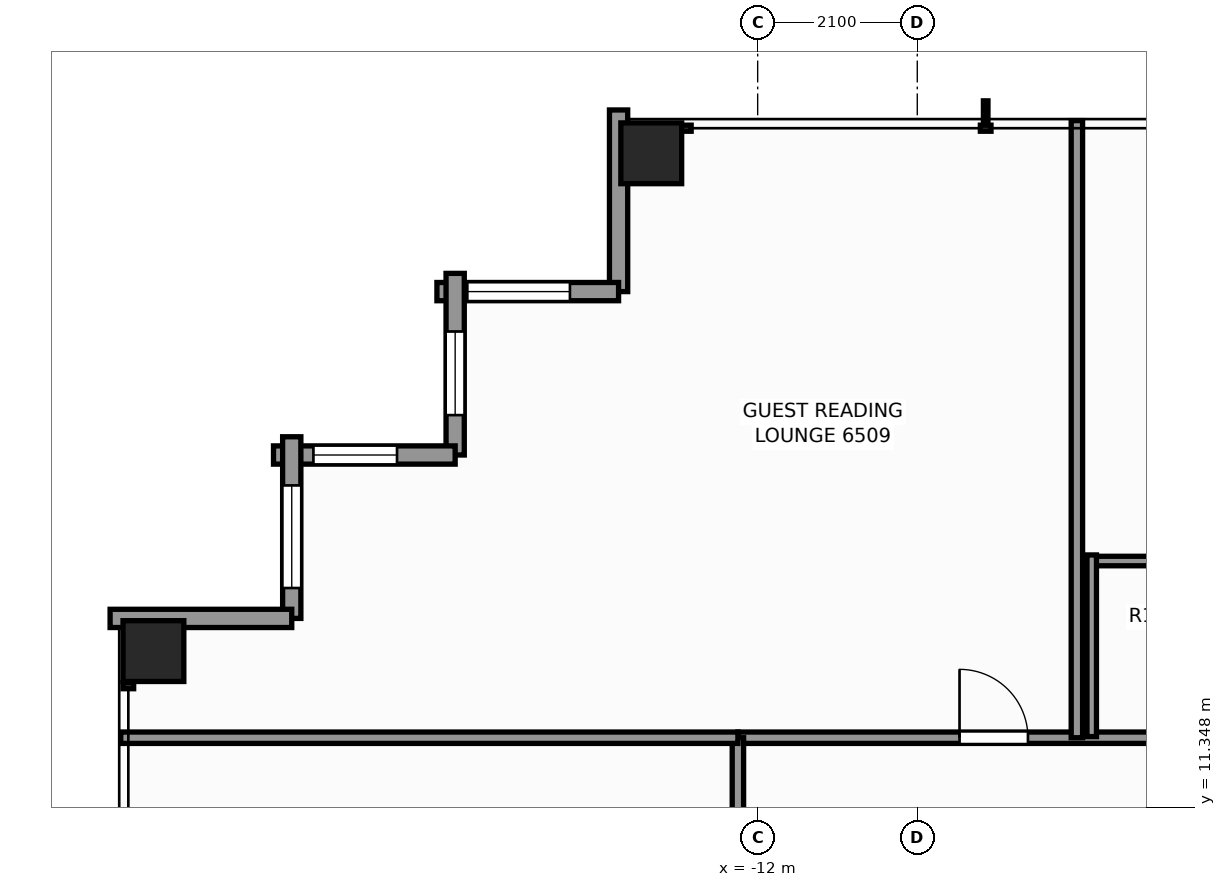
"""IFC4 building model, lengths in metres.
Left out: names, types, materials, properties, quantities, classifications, styles, units other than length and angle.
Written with IfcOpenShell. Run it as: python <this file> out.ifc"""

import sys

from ifc_helpers import new_model, si_unit, direction, frame, frame_2d, origin, origin_2d, place, context, subcontext, project, spatial, rectangle, extrude, element, fill, save


model = new_model("IFC4")
c1 = context("Model", 3, precision=1e-05, world=origin(), true_north=direction((0.0, 1.0)))
c2 = subcontext(c1, "Body", "Model", "MODEL_VIEW")
j1 = project(units=[si_unit("LENGTHUNIT", "METRE"), si_unit("PLANEANGLEUNIT", "RADIAN")], contexts=[c1])
p1 = place(None, origin())
s1 = spatial("IfcSite", under=j1, at=p1, CompositionType="ELEMENT")
p2 = place(p1, origin())
s2 = spatial("IfcBuilding", under=s1, at=p2, CompositionType="ELEMENT")
p3 = place(p2, frame((0.0, 0.0, 222.9)))
s3 = spatial("IfcBuildingStorey", under=s2, at=p3, CompositionType="ELEMENT", Elevation=222.9)
for number, where, z_axis, x_axis in (
    (1, (-13.4, 19.95, 0.0), (0.0, 0.0, 1.0), (1.0, 0.0, 0.0)),
    (2, (-19.95, 13.4, 0.0), (0.0, 0.0, 1.0), (1.0, 0.0, 0.0)),
):
    element("IfcColumn", number, at=place(p3, frame(where, z_axis=z_axis, x_axis=x_axis)), inside=s3, PredefinedType="COLUMN", context=c2, shape_type="SweptSolid", body=[
        extrude(rectangle(XDim=0.8, YDim=0.8, at=origin_2d()), origin(), (0.0, 0.0, 1.0), 3.3),
    ])
p4 = place(p3, frame((-13.83, 18.13, 0.0), z_axis=(0.0, 0.0, 1.0), x_axis=(0.0, 1.0, 0.0)))
e3 = element("IfcWall", 3, at=p4, inside=s3, PredefinedType="STANDARD", context=c2, shape_type="SweptSolid", body=[
    extrude(rectangle(XDim=2.39, YDim=0.24, at=frame_2d((1.195, 0.0))), origin(), (0.0, 0.0, 1.0), 2.463),
])
p5 = place(p3, frame((-16.22, 18.13, 0.0), z_axis=(0.0, 0.0, 1.0), x_axis=(1.0, 0.0, 0.0)))
e4 = element("IfcWall", 4, at=p5, inside=s3, PredefinedType="STANDARD", context=c2, shape_type="SweptSolid", body=[
    extrude(rectangle(XDim=2.39, YDim=0.24, at=frame_2d((1.195, 0.0))), origin(), (0.0, 0.0, 1.0), 2.463),
])
p6 = place(p5, frame((0.4, 0.0, 0.65)))
e5 = element("IfcOpeningElement", 5, at=p6, cuts=e4, PredefinedType="OPENING", context=c2, shape_type="SweptSolid", body=[
    extrude(rectangle(XDim=1.35, YDim=1.55, at=frame_2d((0.675, 0.775))), frame((0.0, 0.13, 0.0), z_axis=(0.0, -1.0, 0.0), x_axis=(1.0, 0.0, 0.0)), (0.0, 0.0, 1.0), 0.26),
])
p7 = place(p3, frame((-15.98, 15.98, 0.0), z_axis=(0.0, 0.0, 1.0), x_axis=(0.0, 1.0, 0.0)))
e6 = element("IfcWall", 6, at=p7, inside=s3, PredefinedType="STANDARD", context=c2, shape_type="SweptSolid", body=[
    extrude(rectangle(XDim=2.39, YDim=0.24, at=frame_2d((1.195, 0.0))), origin(), (0.0, 0.0, 1.0), 2.463),
])
p8 = place(p7, frame((0.525, 0.0, 0.65)))
e7 = element("IfcOpeningElement", 7, at=p8, cuts=e6, PredefinedType="OPENING", context=c2, shape_type="SweptSolid", body=[
    extrude(rectangle(XDim=1.1, YDim=1.45, at=frame_2d((0.55, 0.725))), frame((0.0, 0.13, 0.0), z_axis=(0.0, -1.0, 0.0), x_axis=(1.0, 0.0, 0.0)), (0.0, 0.0, 1.0), 0.26),
])
p9 = place(p3, frame((-18.37, 15.98, 0.0), z_axis=(0.0, 0.0, 1.0), x_axis=(1.0, 0.0, 0.0)))
e8 = element("IfcWall", 8, at=p9, inside=s3, PredefinedType="STANDARD", context=c2, shape_type="SweptSolid", body=[
    extrude(rectangle(XDim=2.39, YDim=0.24, at=frame_2d((1.195, 0.0))), origin(), (0.0, 0.0, 1.0), 2.463),
])
p10 = place(p9, frame((0.525, 0.0, 0.65)))
e9 = element("IfcOpeningElement", 9, at=p10, cuts=e8, PredefinedType="OPENING", context=c2, shape_type="SweptSolid", body=[
    extrude(rectangle(XDim=1.1, YDim=1.45, at=frame_2d((0.55, 0.725))), frame((0.0, 0.13, 0.0), z_axis=(0.0, -1.0, 0.0), x_axis=(1.0, 0.0, 0.0)), (0.0, 0.0, 1.0), 0.26),
])
p11 = place(p3, frame((-18.13, 13.83, 0.0), z_axis=(0.0, 0.0, 1.0), x_axis=(0.0, 1.0, 0.0)))
e10 = element("IfcWall", 10, at=p11, inside=s3, PredefinedType="STANDARD", context=c2, shape_type="SweptSolid", body=[
    extrude(rectangle(XDim=2.39, YDim=0.24, at=frame_2d((1.195, 0.0))), origin(), (0.0, 0.0, 1.0), 2.463),
])
p12 = place(p11, frame((0.4, 0.0, 0.65)))
e11 = element("IfcOpeningElement", 11, at=p12, cuts=e10, PredefinedType="OPENING", context=c2, shape_type="SweptSolid", body=[
    extrude(rectangle(XDim=1.35, YDim=1.55, at=frame_2d((0.675, 0.775))), frame((0.0, 0.13, 0.0), z_axis=(0.0, -1.0, 0.0), x_axis=(1.0, 0.0, 0.0)), (0.0, 0.0, 1.0), 0.26),
])
p13 = place(p3, frame((-20.52, 13.83, 0.0), z_axis=(0.0, 0.0, 1.0), x_axis=(1.0, 0.0, 0.0)))
e12 = element("IfcWall", 12, at=p13, inside=s3, PredefinedType="STANDARD", context=c2, shape_type="SweptSolid", body=[
    extrude(rectangle(XDim=2.39, YDim=0.24, at=frame_2d((1.195, 0.0))), origin(), (0.0, 0.0, 1.0), 2.463),
])
p14 = place(p3, frame((-12.26, 12.26, 0.0), z_axis=(0.0, 0.0, 1.0), x_axis=(1.0, 0.0, 0.0)))
e13 = element("IfcWall", 13, at=p14, inside=s3, PredefinedType="PARTITIONING", context=c2, shape_type="SweptSolid", body=[
    extrude(rectangle(XDim=24.52, YDim=0.15, at=frame_2d((12.26, 0.0))), origin(), (0.0, 0.0, 1.0), 2.369),
])
p15 = place(p14, frame((2.916, 0.0, 0.0)))
e14 = element("IfcOpeningElement", 14, at=p15, cuts=e13, PredefinedType="OPENING", context=c2, shape_type="SweptSolid", body=[
    extrude(rectangle(XDim=0.9, YDim=2.06, at=frame_2d((0.45, 1.03))), frame((0.0, 0.085, 0.0), z_axis=(0.0, -1.0, 0.0), x_axis=(1.0, 0.0, 0.0)), (0.0, 0.0, 1.0), 0.17),
])
p16 = place(p14, frame((9.755, 0.0, 0.0)))
e15 = element("IfcOpeningElement", 15, at=p16, cuts=e13, PredefinedType="OPENING", context=c2, shape_type="SweptSolid", body=[
    extrude(rectangle(XDim=0.95, YDim=2.06, at=frame_2d((0.475, 1.03))), frame((0.0, 0.085, 0.0), z_axis=(0.0, -1.0, 0.0), x_axis=(1.0, 0.0, 0.0)), (0.0, 0.0, 1.0), 0.17),
])
p17 = place(p14, frame((19.345, 0.0, 0.0)))
e16 = element("IfcOpeningElement", 16, at=p17, cuts=e13, PredefinedType="OPENING", context=c2, shape_type="SweptSolid", body=[
    extrude(rectangle(XDim=0.9, YDim=2.06, at=frame_2d((0.45, 1.03))), frame((0.0, 0.085, 0.0), z_axis=(0.0, -1.0, 0.0), x_axis=(1.0, 0.0, 0.0)), (0.0, 0.0, 1.0), 0.17),
])
p18 = place(p3, frame((-12.26, -12.58, 0.0), z_axis=(0.0, 0.0, 1.0), x_axis=(0.0, 1.0, 0.0)))
e17 = element("IfcWall", 17, at=p18, inside=s3, PredefinedType="PARTITIONING", context=c2, shape_type="SweptSolid", body=[
    extrude(rectangle(XDim=24.84, YDim=0.15, at=frame_2d((12.42, 0.0))), origin(), (0.0, 0.0, 1.0), 2.369),
])
p19 = place(p18, frame((3.622, 0.0, 0.0)))
e18 = element("IfcOpeningElement", 18, at=p19, cuts=e17, PredefinedType="OPENING", context=c2, shape_type="SweptSolid", body=[
    extrude(rectangle(XDim=0.9, YDim=2.06, at=frame_2d((0.45, 1.03))), frame((0.0, 0.085, 0.0), z_axis=(0.0, -1.0, 0.0), x_axis=(1.0, 0.0, 0.0)), (0.0, 0.0, 1.0), 0.17),
])
p20 = place(p18, frame((5.698, 0.0, 0.0)))
e19 = element("IfcOpeningElement", 19, at=p20, cuts=e17, PredefinedType="OPENING", context=c2, shape_type="SweptSolid", body=[
    extrude(rectangle(XDim=0.9, YDim=2.06, at=frame_2d((0.45, 1.03))), frame((0.0, 0.085, 0.0), z_axis=(0.0, -1.0, 0.0), x_axis=(1.0, 0.0, 0.0)), (0.0, 0.0, 1.0), 0.17),
])
p21 = place(p18, frame((14.16, 0.0, 0.0)))
e20 = element("IfcOpeningElement", 20, at=p21, cuts=e17, PredefinedType="OPENING", context=c2, shape_type="SweptSolid", body=[
    extrude(rectangle(XDim=0.9, YDim=2.06, at=frame_2d((0.45, 1.03))), frame((0.0, 0.085, 0.0), z_axis=(0.0, -1.0, 0.0), x_axis=(1.0, 0.0, 0.0)), (0.0, 0.0, 1.0), 0.17),
])
p22 = place(p18, frame((21.137, 0.0, 0.0)))
e21 = element("IfcOpeningElement", 21, at=p22, cuts=e17, PredefinedType="OPENING", context=c2, shape_type="SweptSolid", body=[
    extrude(rectangle(XDim=0.95, YDim=2.06, at=frame_2d((0.475, 1.03))), frame((0.0, 0.085, 0.0), z_axis=(0.0, -1.0, 0.0), x_axis=(1.0, 0.0, 0.0)), (0.0, 0.0, 1.0), 0.17),
])
p23 = place(p3, frame((-20.38, 12.26, 0.0), z_axis=(0.0, 0.0, 1.0), x_axis=(1.0, 0.0, 0.0)))
e22 = element("IfcWall", 22, at=p23, inside=s3, PredefinedType="PARTITIONING", context=c2, shape_type="SweptSolid", body=[
    extrude(rectangle(XDim=8.12, YDim=0.15, at=frame_2d((4.06, 0.0))), origin(), (0.0, 0.0, 1.0), 2.369),
])
p24 = place(p3, frame((-7.8, 12.26, 0.0), z_axis=(0.0, 0.0, 1.0), x_axis=(0.0, 1.0, 0.0)))
e23 = element("IfcWall", 23, at=p24, inside=s3, PredefinedType="PARTITIONING", context=c2, shape_type="SweptSolid", body=[
    extrude(rectangle(XDim=8.12, YDim=0.15, at=frame_2d((4.06, 0.0))), origin(), (0.0, 0.0, 1.0), 2.453),
])
p25 = place(p3, frame((-7.665, 14.585, 0.0), z_axis=(0.0, 0.0, 1.0), x_axis=(1.0, 0.0, 0.0)))
e24 = element("IfcWall", 24, at=p25, inside=s3, PredefinedType="PARTITIONING", context=c2, shape_type="SweptSolid", body=[
    extrude(rectangle(XDim=2.77, YDim=0.125, at=frame_2d((1.385, 0.0))), origin(), (0.0, 0.0, 1.0), 3.08),
])
p26 = place(p3, frame((-7.605, 12.275, 0.0), z_axis=(0.0, 0.0, 1.0), x_axis=(0.0, 1.0, 0.0)))
e25 = element("IfcWall", 25, at=p26, inside=s3, PredefinedType="PARTITIONING", context=c2, shape_type="SweptSolid", body=[
    extrude(rectangle(XDim=2.39, YDim=0.125, at=frame_2d((1.195, 0.0))), origin(), (0.0, 0.0, 1.0), 3.08),
])
p27 = place(p6, origin())
e26 = element("IfcWindow", 26, at=p27, inside=s3, PartitioningType="SINGLE_PANEL", PredefinedType="WINDOW", context=c2, shape_type="SweptSolid", body=[
    extrude(rectangle(XDim=1.35, YDim=1.55, at=frame_2d((0.675, 0.775))), frame((0.0, 0.03, 0.0), z_axis=(0.0, -1.0, 0.0), x_axis=(1.0, 0.0, 0.0)), (0.0, 0.0, 1.0), 0.06),
])
fill(e5, e26)
p28 = place(p8, origin())
e27 = element("IfcWindow", 27, at=p28, inside=s3, PartitioningType="SINGLE_PANEL", PredefinedType="WINDOW", context=c2, shape_type="SweptSolid", body=[
    extrude(rectangle(XDim=1.1, YDim=1.45, at=frame_2d((0.55, 0.725))), frame((0.0, 0.03, 0.0), z_axis=(0.0, -1.0, 0.0), x_axis=(1.0, 0.0, 0.0)), (0.0, 0.0, 1.0), 0.06),
])
fill(e7, e27)
p29 = place(p10, origin())
e28 = element("IfcWindow", 28, at=p29, inside=s3, PartitioningType="SINGLE_PANEL", PredefinedType="WINDOW", context=c2, shape_type="SweptSolid", body=[
    extrude(rectangle(XDim=1.1, YDim=1.45, at=frame_2d((0.55, 0.725))), frame((0.0, 0.03, 0.0), z_axis=(0.0, -1.0, 0.0), x_axis=(1.0, 0.0, 0.0)), (0.0, 0.0, 1.0), 0.06),
])
fill(e9, e28)
p30 = place(p12, origin())
e29 = element("IfcWindow", 29, at=p30, inside=s3, PartitioningType="SINGLE_PANEL", PredefinedType="WINDOW", context=c2, shape_type="SweptSolid", body=[
    extrude(rectangle(XDim=1.35, YDim=1.55, at=frame_2d((0.675, 0.775))), frame((0.0, 0.03, 0.0), z_axis=(0.0, -1.0, 0.0), x_axis=(1.0, 0.0, 0.0)), (0.0, 0.0, 1.0), 0.06),
])
fill(e11, e29)
p31 = place(p15, origin())
e30 = element("IfcDoor", 30, at=p31, inside=s3, OperationType="SINGLE_SWING_LEFT", PredefinedType="DOOR", context=c2, shape_type="SweptSolid", body=[
    extrude(rectangle(XDim=0.9, YDim=2.06, at=frame_2d((0.45, 1.03))), frame((0.0, 0.025, 0.0), z_axis=(0.0, -1.0, 0.0), x_axis=(1.0, 0.0, 0.0)), (0.0, 0.0, 1.0), 0.05),
])
fill(e14, e30)
save(model, sys.argv[1])
